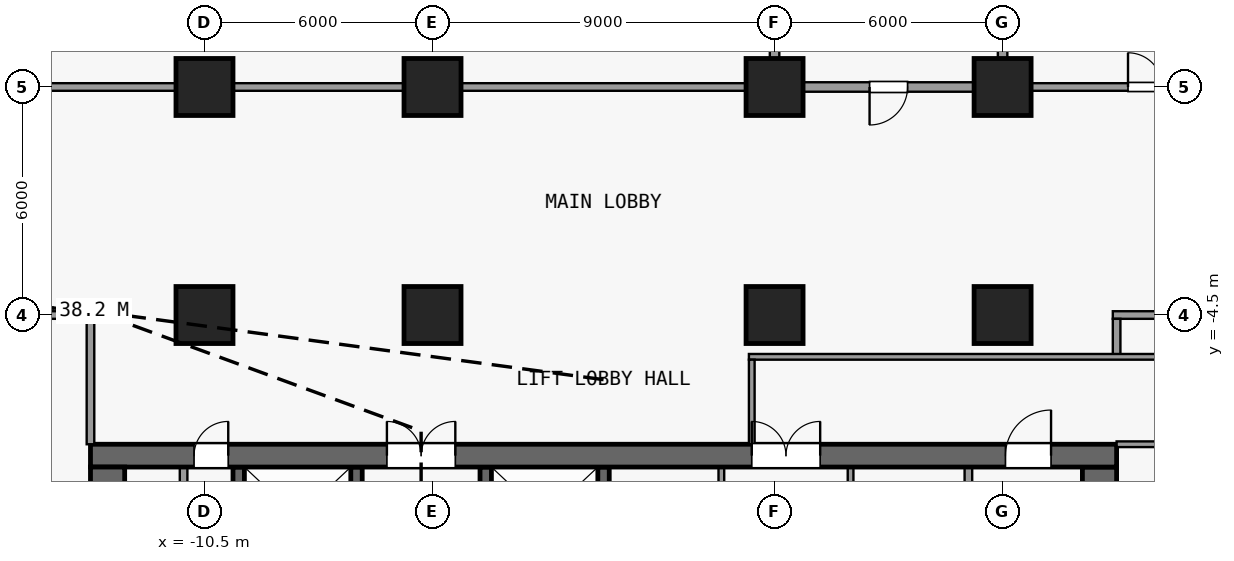
"""IFC4 building model, lengths in metres.
Left out: names, types, materials, properties, quantities, classifications, styles, units other than length and angle.
Written with IfcOpenShell. Run it as: python <this file> out.ifc"""

import sys

from ifc_helpers import new_model, si_unit, direction, frame, frame_2d, origin, origin_2d, place, context, subcontext, project, spatial, rectangle, extrude, element, fill, save


model = new_model("IFC4")
c1 = context("Model", 3, precision=1e-05, world=origin(), true_north=direction((0.0, 1.0)))
c2 = subcontext(c1, "Body", "Model", "MODEL_VIEW")
j1 = project(units=[si_unit("LENGTHUNIT", "METRE"), si_unit("PLANEANGLEUNIT", "RADIAN")], contexts=[c1])
p1 = place(None, origin())
s1 = spatial("IfcSite", under=j1, at=p1, CompositionType="ELEMENT")
p2 = place(p1, origin())
s2 = spatial("IfcBuilding", under=s1, at=p2, CompositionType="ELEMENT")
p3 = place(p2, origin())
s3 = spatial("IfcBuildingStorey", under=s2, at=p3, CompositionType="ELEMENT", Elevation=0.0)
for number, where, z_axis, x_axis in (
    (1, (-10.5, -4.5, 0.0), (0.0, 0.0, 1.0), (1.0, 0.0, 0.0)),
    (2, (-10.5, 1.5, 0.0), (0.0, 0.0, 1.0), (1.0, 0.0, 0.0)),
    (3, (-4.5, -4.5, 0.0), (0.0, 0.0, 1.0), (1.0, 0.0, 0.0)),
    (4, (-4.5, 1.5, 0.0), (0.0, 0.0, 1.0), (1.0, 0.0, 0.0)),
    (5, (4.5, -4.5, 0.0), (0.0, 0.0, 1.0), (1.0, 0.0, 0.0)),
    (6, (4.5, 1.5, 0.0), (0.0, 0.0, 1.0), (1.0, 0.0, 0.0)),
    (7, (10.5, -4.5, 0.0), (0.0, 0.0, 1.0), (1.0, 0.0, 0.0)),
    (8, (10.5, 1.5, 0.0), (0.0, 0.0, 1.0), (1.0, 0.0, 0.0)),
):
    element("IfcColumn", number, at=place(p3, frame(where, z_axis=z_axis, x_axis=x_axis)), inside=s3, PredefinedType="COLUMN", context=c2, shape_type="SweptSolid", body=[
        extrude(rectangle(XDim=1.5, YDim=1.5, at=origin_2d()), origin(), (0.0, 0.0, 1.0), 8.0),
    ])
p4 = place(p3, frame((-13.5, -8.2, 0.0), z_axis=(0.0, 0.0, 1.0), x_axis=(1.0, 0.0, 0.0)))
e9 = element("IfcWall", 9, at=p4, inside=s3, PredefinedType="SHEAR", context=c2, shape_type="SweptSolid", body=[
    extrude(rectangle(XDim=27.0, YDim=0.6, at=frame_2d((13.5, 0.0))), origin(), (0.0, 0.0, 1.0), 7.65),
])
p5 = place(p4, frame((7.8, 0.0, 0.0)))
e10 = element("IfcOpeningElement", 10, at=p5, cuts=e9, PredefinedType="OPENING", context=c2, shape_type="SweptSolid", body=[
    extrude(rectangle(XDim=1.8, YDim=2.1, at=frame_2d((0.9, 1.05))), frame((0.0, 0.31, 0.0), z_axis=(0.0, -1.0, 0.0), x_axis=(1.0, 0.0, 0.0)), (0.0, 0.0, 1.0), 0.62),
])
p6 = place(p4, frame((17.4, 0.0, 0.0)))
e11 = element("IfcOpeningElement", 11, at=p6, cuts=e9, PredefinedType="OPENING", context=c2, shape_type="SweptSolid", body=[
    extrude(rectangle(XDim=1.8, YDim=2.1, at=frame_2d((0.9, 1.05))), frame((0.0, 0.31, 0.0), z_axis=(0.0, -1.0, 0.0), x_axis=(1.0, 0.0, 0.0)), (0.0, 0.0, 1.0), 0.62),
])
p7 = place(p4, frame((2.725, 0.0, 0.0)))
e12 = element("IfcOpeningElement", 12, at=p7, cuts=e9, PredefinedType="OPENING", context=c2, shape_type="SweptSolid", body=[
    extrude(rectangle(XDim=0.9, YDim=2.1, at=frame_2d((0.45, 1.05))), frame((0.0, 0.31, 0.0), z_axis=(0.0, -1.0, 0.0), x_axis=(1.0, 0.0, 0.0)), (0.0, 0.0, 1.0), 0.62),
])
p8 = place(p4, frame((24.075, 0.0, 0.0)))
e13 = element("IfcOpeningElement", 13, at=p8, cuts=e9, PredefinedType="OPENING", context=c2, shape_type="SweptSolid", body=[
    extrude(rectangle(XDim=1.2, YDim=2.1, at=frame_2d((0.6, 1.05))), frame((0.0, 0.31, 0.0), z_axis=(0.0, -1.0, 0.0), x_axis=(1.0, 0.0, 0.0)), (0.0, 0.0, 1.0), 0.62),
])
p9 = place(p3, frame((-13.05, -8.5, 0.0), z_axis=(0.0, 0.0, 1.0), x_axis=(0.0, -1.0, 0.0)))
e14 = element("IfcWall", 14, at=p9, inside=s3, PredefinedType="SHEAR", context=c2, shape_type="SweptSolid", body=[
    extrude(rectangle(XDim=16.1, YDim=0.9, at=frame_2d((8.05, 0.0))), origin(), (0.0, 0.0, 1.0), 7.65),
])
p10 = place(p9, frame((14.8, 0.0, 0.0)))
e15 = element("IfcOpeningElement", 15, at=p10, cuts=e14, PredefinedType="OPENING", context=c2, shape_type="SweptSolid", body=[
    extrude(rectangle(XDim=1.1, YDim=2.1, at=frame_2d((0.55, 1.05))), frame((0.0, 0.46, 0.0), z_axis=(0.0, -1.0, 0.0), x_axis=(1.0, 0.0, 0.0)), (0.0, 0.0, 1.0), 0.92),
])
p11 = place(p3, frame((13.05, -24.6, 0.0), z_axis=(0.0, 0.0, 1.0), x_axis=(0.0, 1.0, 0.0)))
e16 = element("IfcWall", 16, at=p11, inside=s3, PredefinedType="SHEAR", context=c2, shape_type="SweptSolid", body=[
    extrude(rectangle(XDim=16.1, YDim=0.9, at=frame_2d((8.05, 0.0))), origin(), (0.0, 0.0, 1.0), 7.65),
])
p12 = place(p3, frame((-11.05, -12.1, 0.0), z_axis=(0.0, 0.0, 1.0), x_axis=(0.0, 1.0, 0.0)))
e17 = element("IfcWall", 17, at=p12, inside=s3, PredefinedType="PARTITIONING", context=c2, shape_type="SweptSolid", body=[
    extrude(rectangle(XDim=3.6, YDim=0.2, at=frame_2d((1.8, 0.0))), origin(), (0.0, 0.0, 1.0), 7.65),
])
p13 = place(p12, frame((1.4, 0.0, 0.0)))
e18 = element("IfcOpeningElement", 18, at=p13, cuts=e17, PredefinedType="OPENING", context=c2, shape_type="SweptSolid", body=[
    extrude(rectangle(XDim=0.9, YDim=2.1, at=frame_2d((0.45, 1.05))), frame((0.0, 0.11, 0.0), z_axis=(0.0, -1.0, 0.0), x_axis=(1.0, 0.0, 0.0)), (0.0, 0.0, 1.0), 0.22),
])
p14 = place(p3, frame((-9.6, -17.2, 0.0), z_axis=(0.0, 0.0, 1.0), x_axis=(0.0, 1.0, 0.0)))
e19 = element("IfcWall", 19, at=p14, inside=s3, PredefinedType="SHEAR", context=c2, shape_type="SweptSolid", body=[
    extrude(rectangle(XDim=8.7, YDim=0.3, at=frame_2d((4.35, 0.0))), origin(), (0.0, 0.0, 1.0), 7.65),
])
p15 = place(p3, frame((-6.5, -22.5, 0.0), z_axis=(0.0, 0.0, 1.0), x_axis=(0.0, 1.0, 0.0)))
e20 = element("IfcWall", 20, at=p15, inside=s3, PredefinedType="SHEAR", context=c2, shape_type="SweptSolid", body=[
    extrude(rectangle(XDim=14.0, YDim=0.3, at=frame_2d((7.0, 0.0))), origin(), (0.0, 0.0, 1.0), 7.65),
])
p16 = place(p15, frame((0.94, 0.0, 0.0)))
e21 = element("IfcOpeningElement", 21, at=p16, cuts=e20, PredefinedType="OPENING", context=c2, shape_type="SweptSolid", body=[
    extrude(rectangle(XDim=1.1, YDim=2.1, at=frame_2d((0.55, 1.05))), frame((0.0, 0.16, 0.0), z_axis=(0.0, -1.0, 0.0), x_axis=(1.0, 0.0, 0.0)), (0.0, 0.0, 1.0), 0.32),
])
p17 = place(p15, frame((3.72, 0.0, 0.0)))
e22 = element("IfcOpeningElement", 22, at=p17, cuts=e20, PredefinedType="OPENING", context=c2, shape_type="SweptSolid", body=[
    extrude(rectangle(XDim=1.1, YDim=2.1, at=frame_2d((0.55, 1.05))), frame((0.0, 0.16, 0.0), z_axis=(0.0, -1.0, 0.0), x_axis=(1.0, 0.0, 0.0)), (0.0, 0.0, 1.0), 0.32),
])
p18 = place(p15, frame((6.5, 0.0, 0.0)))
e23 = element("IfcOpeningElement", 23, at=p18, cuts=e20, PredefinedType="OPENING", context=c2, shape_type="SweptSolid", body=[
    extrude(rectangle(XDim=1.1, YDim=2.1, at=frame_2d((0.55, 1.05))), frame((0.0, 0.16, 0.0), z_axis=(0.0, -1.0, 0.0), x_axis=(1.0, 0.0, 0.0)), (0.0, 0.0, 1.0), 0.32),
])
p19 = place(p15, frame((9.28, 0.0, 0.0)))
e24 = element("IfcOpeningElement", 24, at=p19, cuts=e20, PredefinedType="OPENING", context=c2, shape_type="SweptSolid", body=[
    extrude(rectangle(XDim=1.1, YDim=2.1, at=frame_2d((0.55, 1.05))), frame((0.0, 0.16, 0.0), z_axis=(0.0, -1.0, 0.0), x_axis=(1.0, 0.0, 0.0)), (0.0, 0.0, 1.0), 0.32),
])
p20 = place(p15, frame((12.06, 0.0, 0.0)))
e25 = element("IfcOpeningElement", 25, at=p20, cuts=e20, PredefinedType="OPENING", context=c2, shape_type="SweptSolid", body=[
    extrude(rectangle(XDim=1.1, YDim=2.1, at=frame_2d((0.55, 1.05))), frame((0.0, 0.16, 0.0), z_axis=(0.0, -1.0, 0.0), x_axis=(1.0, 0.0, 0.0)), (0.0, 0.0, 1.0), 0.32),
])
p21 = place(p3, frame((-3.1, -22.55, 0.0), z_axis=(0.0, 0.0, 1.0), x_axis=(0.0, 1.0, 0.0)))
e26 = element("IfcWall", 26, at=p21, inside=s3, PredefinedType="SHEAR", context=c2, shape_type="SweptSolid", body=[
    extrude(rectangle(XDim=14.05, YDim=0.3, at=frame_2d((7.025, 0.0))), origin(), (0.0, 0.0, 1.0), 7.65),
])
p22 = place(p21, frame((12.11, 0.0, 0.0)))
e27 = element("IfcOpeningElement", 27, at=p22, cuts=e26, PredefinedType="OPENING", context=c2, shape_type="SweptSolid", body=[
    extrude(rectangle(XDim=1.1, YDim=2.1, at=frame_2d((0.55, 1.05))), frame((0.0, 0.16, 0.0), z_axis=(0.0, -1.0, 0.0), x_axis=(1.0, 0.0, 0.0)), (0.0, 0.0, 1.0), 0.32),
])
p23 = place(p21, frame((3.77, 0.0, 0.0)))
e28 = element("IfcOpeningElement", 28, at=p23, cuts=e26, PredefinedType="OPENING", context=c2, shape_type="SweptSolid", body=[
    extrude(rectangle(XDim=1.1, YDim=2.1, at=frame_2d((0.55, 1.05))), frame((0.0, 0.16, 0.0), z_axis=(0.0, -1.0, 0.0), x_axis=(1.0, 0.0, 0.0)), (0.0, 0.0, 1.0), 0.32),
])
p24 = place(p21, frame((6.55, 0.0, 0.0)))
e29 = element("IfcOpeningElement", 29, at=p24, cuts=e26, PredefinedType="OPENING", context=c2, shape_type="SweptSolid", body=[
    extrude(rectangle(XDim=1.1, YDim=2.1, at=frame_2d((0.55, 1.05))), frame((0.0, 0.16, 0.0), z_axis=(0.0, -1.0, 0.0), x_axis=(1.0, 0.0, 0.0)), (0.0, 0.0, 1.0), 0.32),
])
p25 = place(p21, frame((9.33, 0.0, 0.0)))
e30 = element("IfcOpeningElement", 30, at=p25, cuts=e26, PredefinedType="OPENING", context=c2, shape_type="SweptSolid", body=[
    extrude(rectangle(XDim=1.1, YDim=2.1, at=frame_2d((0.55, 1.05))), frame((0.0, 0.16, 0.0), z_axis=(0.0, -1.0, 0.0), x_axis=(1.0, 0.0, 0.0)), (0.0, 0.0, 1.0), 0.32),
])
p26 = place(p21, frame((0.84, 0.0, 0.0)))
e31 = element("IfcOpeningElement", 31, at=p26, cuts=e26, PredefinedType="OPENING", context=c2, shape_type="SweptSolid", body=[
    extrude(rectangle(XDim=1.4, YDim=2.1, at=frame_2d((0.7, 1.05))), frame((0.0, 0.16, 0.0), z_axis=(0.0, -1.0, 0.0), x_axis=(1.0, 0.0, 0.0)), (0.0, 0.0, 1.0), 0.32),
])
p27 = place(p3, frame((0.0, -22.25, 0.0), z_axis=(0.0, 0.0, 1.0), x_axis=(0.0, 1.0, 0.0)))
e32 = element("IfcWall", 32, at=p27, inside=s3, PredefinedType="SHEAR", context=c2, shape_type="SweptSolid", body=[
    extrude(rectangle(XDim=13.75, YDim=0.3, at=frame_2d((6.875, 0.0))), origin(), (0.0, 0.0, 1.0), 7.65),
])
p28 = place(p3, frame((3.1, -19.4, 0.0), z_axis=(0.0, 0.0, 1.0), x_axis=(0.0, 1.0, 0.0)))
e33 = element("IfcWall", 33, at=p28, inside=s3, PredefinedType="PARTITIONING", context=c2, shape_type="SweptSolid", body=[
    extrude(rectangle(XDim=10.9, YDim=0.15, at=frame_2d((5.45, 0.0))), origin(), (0.0, 0.0, 1.0), 7.65),
])
p29 = place(p28, frame((0.825, 0.0, 0.0)))
e34 = element("IfcOpeningElement", 34, at=p29, cuts=e33, PredefinedType="OPENING", context=c2, shape_type="SweptSolid", body=[
    extrude(rectangle(XDim=0.9, YDim=2.1, at=frame_2d((0.45, 1.05))), frame((0.0, 0.085, 0.0), z_axis=(0.0, -1.0, 0.0), x_axis=(1.0, 0.0, 0.0)), (0.0, 0.0, 1.0), 0.17),
])
p30 = place(p28, frame((6.175, 0.0, 0.0)))
e35 = element("IfcOpeningElement", 35, at=p30, cuts=e33, PredefinedType="OPENING", context=c2, shape_type="SweptSolid", body=[
    extrude(rectangle(XDim=1.2, YDim=2.1, at=frame_2d((0.6, 1.05))), frame((0.0, 0.085, 0.0), z_axis=(0.0, -1.0, 0.0), x_axis=(1.0, 0.0, 0.0)), (0.0, 0.0, 1.0), 0.17),
])
p31 = place(p3, frame((6.5, -8.5, 0.0), z_axis=(0.0, 0.0, 1.0), x_axis=(0.0, -1.0, 0.0)))
e36 = element("IfcWall", 36, at=p31, inside=s3, PredefinedType="PARTITIONING", context=c2, shape_type="SweptSolid", body=[
    extrude(rectangle(XDim=10.85, YDim=0.15, at=frame_2d((5.425, 0.0))), origin(), (0.0, 0.0, 1.0), 7.65),
])
p32 = place(p31, frame((7.65, 0.0, 0.0)))
e37 = element("IfcOpeningElement", 37, at=p32, cuts=e36, PredefinedType="OPENING", context=c2, shape_type="SweptSolid", body=[
    extrude(rectangle(XDim=1.2, YDim=2.1, at=frame_2d((0.6, 1.05))), frame((0.0, 0.085, 0.0), z_axis=(0.0, -1.0, 0.0), x_axis=(1.0, 0.0, 0.0)), (0.0, 0.0, 1.0), 0.17),
])
p33 = place(p31, frame((2.15, 0.0, 0.0)))
e38 = element("IfcOpeningElement", 38, at=p33, cuts=e36, PredefinedType="OPENING", context=c2, shape_type="SweptSolid", body=[
    extrude(rectangle(XDim=1.2, YDim=2.1, at=frame_2d((0.6, 1.05))), frame((0.0, 0.085, 0.0), z_axis=(0.0, -1.0, 0.0), x_axis=(1.0, 0.0, 0.0)), (0.0, 0.0, 1.0), 0.17),
])
p34 = place(p3, frame((9.6, -16.9, 0.0), z_axis=(0.0, 0.0, 1.0), x_axis=(0.0, 1.0, 0.0)))
e39 = element("IfcWall", 39, at=p34, inside=s3, PredefinedType="PARTITIONING", context=c2, shape_type="SweptSolid", body=[
    extrude(rectangle(XDim=8.4, YDim=0.2, at=frame_2d((4.2, 0.0))), origin(), (0.0, 0.0, 1.0), 7.65),
])
p35 = place(p3, frame((13.5, -7.9, 0.0), z_axis=(0.0, 0.0, 1.0), x_axis=(1.0, 0.0, 0.0)))
e40 = element("IfcWall", 40, at=p35, inside=s3, PredefinedType="PARTITIONING", context=c2, shape_type="SweptSolid", body=[
    extrude(rectangle(XDim=4.875, YDim=0.15, at=frame_2d((2.438, 0.0))), origin(), (0.0, 0.0, 1.0), 7.65),
])
p36 = place(p3, frame((3.825, -5.6, 0.0), z_axis=(0.0, 0.0, 1.0), x_axis=(1.0, 0.0, 0.0)))
e41 = element("IfcWall", 41, at=p36, inside=s3, PredefinedType="PARTITIONING", context=c2, shape_type="SweptSolid", body=[
    extrude(rectangle(XDim=17.85, YDim=0.15, at=frame_2d((8.925, 0.0))), origin(), (0.0, 0.0, 1.0), 7.65),
])
p37 = place(p3, frame((3.9, -7.9, 0.0), z_axis=(0.0, 0.0, 1.0), x_axis=(0.0, 1.0, 0.0)))
e42 = element("IfcWall", 42, at=p37, inside=s3, PredefinedType="PARTITIONING", context=c2, shape_type="SweptSolid", body=[
    extrude(rectangle(XDim=2.225, YDim=0.15, at=frame_2d((1.112, 0.0))), origin(), (0.0, 0.0, 1.0), 7.65),
])
p38 = place(p3, frame((-31.6, -4.5, 0.0), z_axis=(0.0, 0.0, 1.0), x_axis=(1.0, 0.0, 0.0)))
e43 = element("IfcWall", 43, at=p38, inside=s3, PredefinedType="PARTITIONING", context=c2, shape_type="SweptSolid", body=[
    extrude(rectangle(XDim=18.2, YDim=0.2, at=frame_2d((9.1, 0.0))), origin(), (0.0, 0.0, 1.0), 7.65),
])
p39 = place(p38, frame((3.2, 0.0, 0.0)))
e44 = element("IfcOpeningElement", 44, at=p39, cuts=e43, PredefinedType="OPENING", context=c2, shape_type="SweptSolid", body=[
    extrude(rectangle(XDim=1.0, YDim=2.1, at=frame_2d((0.5, 1.05))), frame((0.0, 0.11, 0.0), z_axis=(0.0, -1.0, 0.0), x_axis=(1.0, 0.0, 0.0)), (0.0, 0.0, 1.0), 0.22),
])
p40 = place(p38, frame((13.2, 0.0, 0.0)))
e45 = element("IfcOpeningElement", 45, at=p40, cuts=e43, PredefinedType="OPENING", context=c2, shape_type="SweptSolid", body=[
    extrude(rectangle(XDim=1.0, YDim=2.1, at=frame_2d((0.5, 1.05))), frame((0.0, 0.11, 0.0), z_axis=(0.0, -1.0, 0.0), x_axis=(1.0, 0.0, 0.0)), (0.0, 0.0, 1.0), 0.22),
])
p41 = place(p3, frame((13.4, -4.5, 0.0), z_axis=(0.0, 0.0, 1.0), x_axis=(1.0, 0.0, 0.0)))
e46 = element("IfcWall", 46, at=p41, inside=s3, PredefinedType="PARTITIONING", context=c2, shape_type="SweptSolid", body=[
    extrude(rectangle(XDim=15.1, YDim=0.2, at=frame_2d((7.55, 0.0))), origin(), (0.0, 0.0, 1.0), 7.65),
])
p42 = place(p41, frame((4.0, 0.0, 0.0)))
e47 = element("IfcOpeningElement", 47, at=p42, cuts=e46, PredefinedType="OPENING", context=c2, shape_type="SweptSolid", body=[
    extrude(rectangle(XDim=1.0, YDim=2.1, at=frame_2d((0.5, 1.05))), frame((0.0, 0.11, 0.0), z_axis=(0.0, -1.0, 0.0), x_axis=(1.0, 0.0, 0.0)), (0.0, 0.0, 1.0), 0.22),
])
p43 = place(p41, frame((11.6, 0.0, 0.0)))
e48 = element("IfcOpeningElement", 48, at=p43, cuts=e46, PredefinedType="OPENING", context=c2, shape_type="SweptSolid", body=[
    extrude(rectangle(XDim=1.0, YDim=2.1, at=frame_2d((0.5, 1.05))), frame((0.0, 0.11, 0.0), z_axis=(0.0, -1.0, 0.0), x_axis=(1.0, 0.0, 0.0)), (0.0, 0.0, 1.0), 0.22),
])
p44 = place(p3, frame((-31.6, 1.5, 0.0), z_axis=(0.0, 0.0, 1.0), x_axis=(1.0, 0.0, 0.0)))
e49 = element("IfcWall", 49, at=p44, inside=s3, PredefinedType="PARTITIONING", context=c2, shape_type="SweptSolid", body=[
    extrude(rectangle(XDim=36.1, YDim=0.2, at=frame_2d((18.05, 0.0))), origin(), (0.0, 0.0, 1.0), 7.65),
])
p45 = place(p44, frame((3.2, 0.0, 0.0)))
e50 = element("IfcOpeningElement", 50, at=p45, cuts=e49, PredefinedType="OPENING", context=c2, shape_type="SweptSolid", body=[
    extrude(rectangle(XDim=1.0, YDim=2.1, at=frame_2d((0.5, 1.05))), frame((0.0, 0.11, 0.0), z_axis=(0.0, -1.0, 0.0), x_axis=(1.0, 0.0, 0.0)), (0.0, 0.0, 1.0), 0.22),
])
p46 = place(p44, frame((13.2, 0.0, 0.0)))
e51 = element("IfcOpeningElement", 51, at=p46, cuts=e49, PredefinedType="OPENING", context=c2, shape_type="SweptSolid", body=[
    extrude(rectangle(XDim=1.0, YDim=2.1, at=frame_2d((0.5, 1.05))), frame((0.0, 0.11, 0.0), z_axis=(0.0, -1.0, 0.0), x_axis=(1.0, 0.0, 0.0)), (0.0, 0.0, 1.0), 0.22),
])
p47 = place(p3, frame((10.5, 1.5, 0.0), z_axis=(0.0, 0.0, 1.0), x_axis=(1.0, 0.0, 0.0)))
e52 = element("IfcWall", 52, at=p47, inside=s3, PredefinedType="PARTITIONING", context=c2, shape_type="SweptSolid", body=[
    extrude(rectangle(XDim=18.0, YDim=0.2, at=frame_2d((9.0, 0.0))), origin(), (0.0, 0.0, 1.0), 7.65),
])
p48 = place(p47, frame((3.3, 0.0, 0.0)))
e53 = element("IfcOpeningElement", 53, at=p48, cuts=e52, PredefinedType="OPENING", context=c2, shape_type="SweptSolid", body=[
    extrude(rectangle(XDim=1.8, YDim=2.1, at=frame_2d((0.9, 1.05))), frame((0.0, 0.11, 0.0), z_axis=(0.0, -1.0, 0.0), x_axis=(1.0, 0.0, 0.0)), (0.0, 0.0, 1.0), 0.22),
])
p49 = place(p47, frame((14.1, 0.0, 0.0)))
e54 = element("IfcOpeningElement", 54, at=p49, cuts=e52, PredefinedType="OPENING", context=c2, shape_type="SweptSolid", body=[
    extrude(rectangle(XDim=1.8, YDim=2.1, at=frame_2d((0.9, 1.05))), frame((0.0, 0.11, 0.0), z_axis=(0.0, -1.0, 0.0), x_axis=(1.0, 0.0, 0.0)), (0.0, 0.0, 1.0), 0.22),
])
p50 = place(p3, frame((4.5, 1.5, 0.0), z_axis=(0.0, 0.0, 1.0), x_axis=(1.0, 0.0, 0.0)))
e55 = element("IfcWall", 55, at=p50, inside=s3, PredefinedType="PARTITIONING", context=c2, shape_type="SweptSolid", body=[
    extrude(rectangle(XDim=6.0, YDim=0.25, at=frame_2d((3.0, 0.0))), origin(), (0.0, 0.0, 1.0), 7.65),
])
p51 = place(p50, frame((2.5, 0.0, 0.0)))
e56 = element("IfcOpeningElement", 56, at=p51, cuts=e55, PredefinedType="OPENING", context=c2, shape_type="SweptSolid", body=[
    extrude(rectangle(XDim=1.0, YDim=2.1, at=frame_2d((0.5, 1.05))), frame((0.0, 0.135, 0.0), z_axis=(0.0, -1.0, 0.0), x_axis=(1.0, 0.0, 0.0)), (0.0, 0.0, 1.0), 0.27),
])
p52 = place(p3, frame((-13.5, -7.9, 0.0), z_axis=(0.0, 0.0, 1.0), x_axis=(0.0, 1.0, 0.0)))
e57 = element("IfcWall", 57, at=p52, inside=s3, PredefinedType="PARTITIONING", context=c2, shape_type="SweptSolid", body=[
    extrude(rectangle(XDim=3.3, YDim=0.2, at=frame_2d((1.65, 0.0))), origin(), (0.0, 0.0, 1.0), 7.65),
])
for number, where, z_axis, x_axis in (
    (58, (4.5, 1.625, 0.0), (0.0, 0.0, 1.0), (0.0, 1.0, 0.0)),
    (59, (10.5, 1.625, 0.0), (0.0, 0.0, 1.0), (0.0, 1.0, 0.0)),
):
    element("IfcWall", number, at=place(p3, frame(where, z_axis=z_axis, x_axis=x_axis)), inside=s3, PredefinedType="PARTITIONING", context=c2, shape_type="SweptSolid", body=[
        extrude(rectangle(XDim=5.75, YDim=0.25, at=frame_2d((2.875, 0.0))), origin(), (0.0, 0.0, 1.0), 7.65),
    ])
p53 = place(p3, frame((13.5, -5.6, 0.0), z_axis=(0.0, 0.0, 1.0), x_axis=(0.0, 1.0, 0.0)))
e60 = element("IfcWall", 60, at=p53, inside=s3, PredefinedType="PARTITIONING", context=c2, shape_type="SweptSolid", body=[
    extrude(rectangle(XDim=1.0, YDim=0.2, at=frame_2d((0.5, 0.0))), origin(), (0.0, 0.0, 1.0), 7.65),
])
p54 = place(p5, origin())
e61 = element("IfcDoor", 61, at=p54, inside=s3, OperationType="DOUBLE_DOOR_SINGLE_SWING", PredefinedType="DOOR", context=c2, shape_type="SweptSolid", body=[
    extrude(rectangle(XDim=1.8, YDim=2.1, at=frame_2d((0.9, 1.05))), frame((0.0, 0.025, 0.0), z_axis=(0.0, -1.0, 0.0), x_axis=(1.0, 0.0, 0.0)), (0.0, 0.0, 1.0), 0.05),
])
fill(e10, e61)
p55 = place(p6, origin())
e62 = element("IfcDoor", 62, at=p55, inside=s3, OperationType="DOUBLE_DOOR_SINGLE_SWING", PredefinedType="DOOR", context=c2, shape_type="SweptSolid", body=[
    extrude(rectangle(XDim=1.8, YDim=2.1, at=frame_2d((0.9, 1.05))), frame((0.0, 0.025, 0.0), z_axis=(0.0, -1.0, 0.0), x_axis=(1.0, 0.0, 0.0)), (0.0, 0.0, 1.0), 0.05),
])
fill(e11, e62)
p56 = place(p7, origin())
e63 = element("IfcDoor", 63, at=p56, inside=s3, OperationType="SINGLE_SWING_RIGHT", PredefinedType="DOOR", context=c2, shape_type="SweptSolid", body=[
    extrude(rectangle(XDim=0.9, YDim=2.1, at=frame_2d((0.45, 1.05))), frame((0.0, 0.025, 0.0), z_axis=(0.0, -1.0, 0.0), x_axis=(1.0, 0.0, 0.0)), (0.0, 0.0, 1.0), 0.05),
])
fill(e12, e63)
p57 = place(p8, origin())
e64 = element("IfcDoor", 64, at=p57, inside=s3, OperationType="SINGLE_SWING_RIGHT", PredefinedType="DOOR", context=c2, shape_type="SweptSolid", body=[
    extrude(rectangle(XDim=1.2, YDim=2.1, at=frame_2d((0.6, 1.05))), frame((0.0, 0.025, 0.0), z_axis=(0.0, -1.0, 0.0), x_axis=(1.0, 0.0, 0.0)), (0.0, 0.0, 1.0), 0.05),
])
fill(e13, e64)
p58 = place(p48, origin())
e65 = element("IfcDoor", 65, at=p58, inside=s3, OperationType="DOUBLE_DOOR_SINGLE_SWING", PredefinedType="DOOR", context=c2, shape_type="SweptSolid", body=[
    extrude(rectangle(XDim=1.8, YDim=2.1, at=frame_2d((0.9, 1.05))), frame((0.0, 0.025, 0.0), z_axis=(0.0, -1.0, 0.0), x_axis=(1.0, 0.0, 0.0)), (0.0, 0.0, 1.0), 0.05),
])
fill(e53, e65)
p59 = place(p51, origin())
e66 = element("IfcDoor", 66, at=p59, inside=s3, OperationType="SINGLE_SWING_LEFT", PredefinedType="DOOR", context=c2, shape_type="SweptSolid", body=[
    extrude(rectangle(XDim=1.0, YDim=2.1, at=frame_2d((0.5, 1.05))), frame((0.0, 0.025, 0.0), z_axis=(0.0, -1.0, 0.0), x_axis=(1.0, 0.0, 0.0)), (0.0, 0.0, 1.0), 0.05),
])
fill(e56, e66)
save(model, sys.argv[1])
